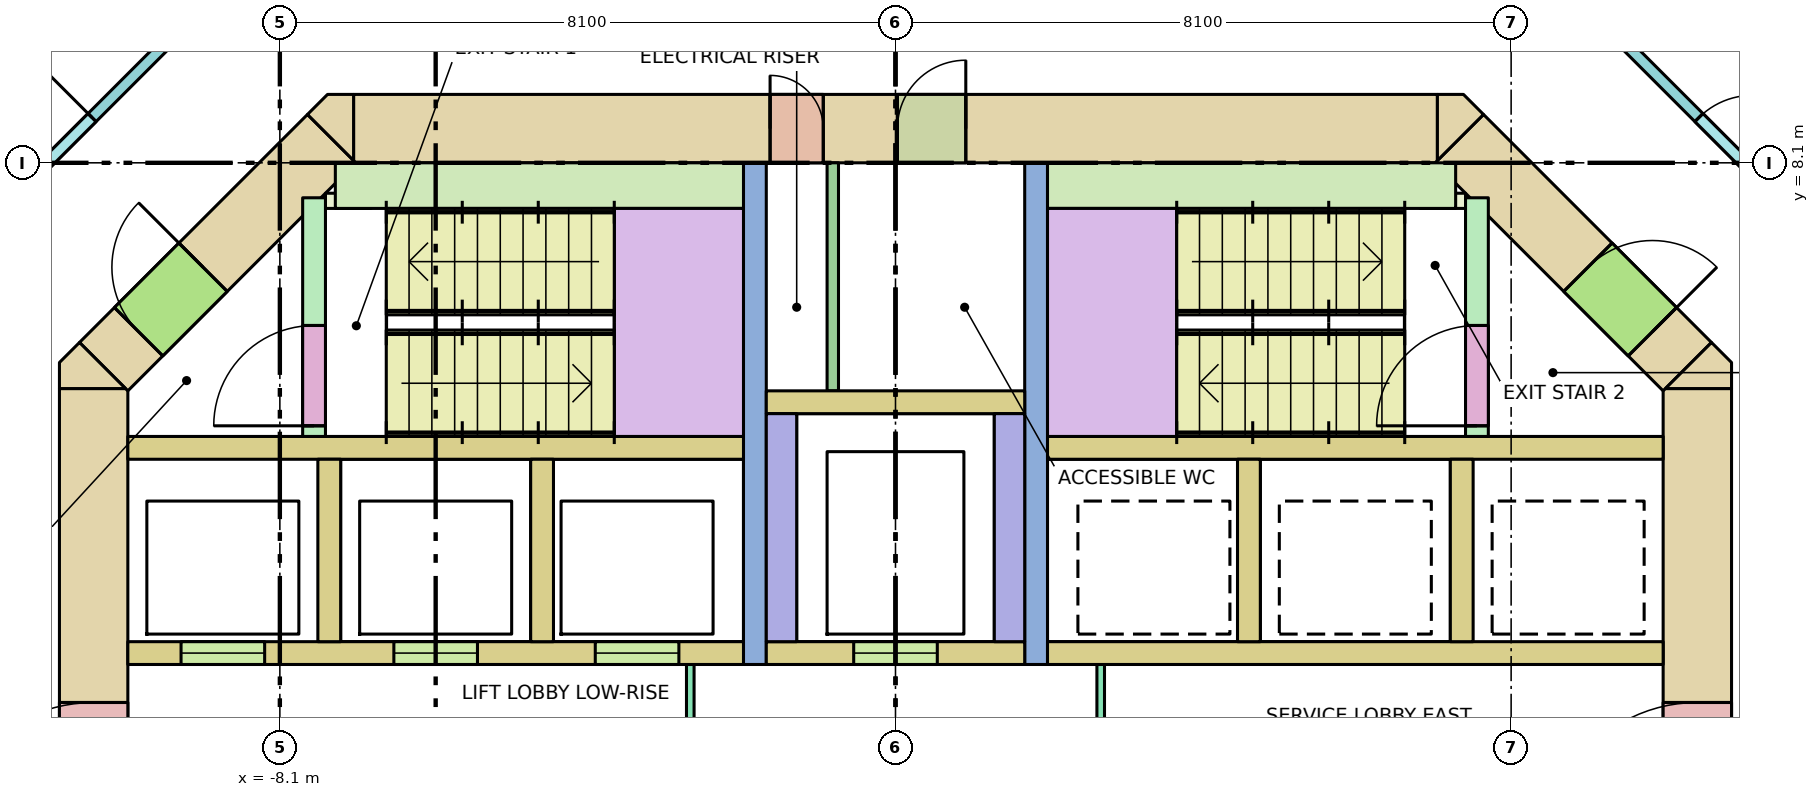
"""IFC4 building model, lengths in metres.
Left out: names, types, materials, properties, quantities, classifications, styles, units other than length and angle.
Written with IfcOpenShell. Run it as: python <this file> out.ifc"""

import sys

from ifc_helpers import new_model, si_unit, direction, frame, frame_2d, origin, place, context, subcontext, project, spatial, polyline, rectangle, outline, extrude, element, fill, save


model = new_model("IFC4")
c1 = context("Model", 3, precision=1e-05, world=origin(), true_north=direction((0.0, 1.0)))
c2 = subcontext(c1, "Body", "Model", "MODEL_VIEW")
j1 = project(units=[si_unit("LENGTHUNIT", "METRE"), si_unit("PLANEANGLEUNIT", "RADIAN")], contexts=[c1])
p1 = place(None, origin())
s1 = spatial("IfcSite", under=j1, at=p1, CompositionType="ELEMENT")
p2 = place(p1, origin())
s2 = spatial("IfcBuilding", under=s1, at=p2, CompositionType="ELEMENT")
p3 = place(p2, frame((0.0, 0.0, 116.2)))
s3 = spatial("IfcBuildingStorey", under=s2, at=p3, CompositionType="ELEMENT", Elevation=116.2)
p4 = place(p3, frame((-7.13, 8.55, -0.28), z_axis=(0.0, 0.0, 1.0), x_axis=(1.0, 0.0, 0.0)))
e1 = element("IfcWall", 1, at=p4, inside=s3, PredefinedType="SHEAR", context=c2, shape_type="SweptSolid", body=[
    extrude(rectangle(XDim=14.26, YDim=0.9, at=frame_2d((7.13, 0.0))), origin(), (0.0, 0.0, 1.0), 3.8),
])
p5 = place(p4, frame((5.48, 0.0, 0.28)))
e2 = element("IfcOpeningElement", 2, at=p5, cuts=e1, PredefinedType="OPENING", context=c2, shape_type="SweptSolid", body=[
    extrude(rectangle(XDim=0.7, YDim=2.1, at=frame_2d((0.35, 1.05))), frame((0.0, 0.46, 0.0), z_axis=(0.0, -1.0, 0.0), x_axis=(1.0, 0.0, 0.0)), (0.0, 0.0, 1.0), 0.92),
])
p6 = place(p4, frame((7.155, 0.0, 0.28)))
e3 = element("IfcOpeningElement", 3, at=p6, cuts=e1, PredefinedType="OPENING", context=c2, shape_type="SweptSolid", body=[
    extrude(rectangle(XDim=0.9, YDim=2.1, at=frame_2d((0.45, 1.05))), frame((0.0, 0.46, 0.0), z_axis=(0.0, -1.0, 0.0), x_axis=(1.0, 0.0, 0.0)), (0.0, 0.0, 1.0), 0.92),
])
p7 = place(p3, frame((-10.55, -5.13, -0.28), z_axis=(0.0, 0.0, 1.0), x_axis=(0.0, 1.0, 0.0)))
e4 = element("IfcWall", 4, at=p7, inside=s3, PredefinedType="SHEAR", context=c2, shape_type="SweptSolid", body=[
    extrude(rectangle(XDim=10.26, YDim=0.9, at=frame_2d((5.13, 0.0))), origin(), (0.0, 0.0, 1.0), 3.8),
])
p8 = place(p7, frame((4.13, 0.0, 0.28)))
e5 = element("IfcOpeningElement", 5, at=p8, cuts=e4, PredefinedType="OPENING", context=c2, shape_type="SweptSolid", body=[
    extrude(rectangle(XDim=2.0, YDim=2.1, at=frame_2d((1.0, 1.05))), frame((0.0, 0.46, 0.0), z_axis=(0.0, -1.0, 0.0), x_axis=(1.0, 0.0, 0.0)), (0.0, 0.0, 1.0), 0.92),
])
p9 = place(p3, frame((10.55, -5.13, -0.28), z_axis=(0.0, 0.0, 1.0), x_axis=(0.0, 1.0, 0.0)))
e6 = element("IfcWall", 6, at=p9, inside=s3, PredefinedType="SHEAR", context=c2, shape_type="SweptSolid", body=[
    extrude(rectangle(XDim=10.26, YDim=0.9, at=frame_2d((5.13, 0.0))), origin(), (0.0, 0.0, 1.0), 3.8),
])
p10 = place(p9, frame((4.13, 0.0, 0.28)))
e7 = element("IfcOpeningElement", 7, at=p10, cuts=e6, PredefinedType="OPENING", context=c2, shape_type="SweptSolid", body=[
    extrude(rectangle(XDim=2.0, YDim=2.1, at=frame_2d((1.0, 1.05))), frame((0.0, 0.46, 0.0), z_axis=(0.0, -1.0, 0.0), x_axis=(1.0, 0.0, 0.0)), (0.0, 0.0, 1.0), 0.92),
])
p11 = place(p3, frame((-10.418, 5.418, -0.28), z_axis=(0.0, 0.0, 1.0), x_axis=(0.707106781187, 0.707106781187, 0.0)))
e8 = element("IfcWall", 8, at=p11, inside=s3, PredefinedType="SHEAR", context=c2, shape_type="SweptSolid", body=[
    extrude(rectangle(XDim=4.243, YDim=0.9, at=frame_2d((2.121, 0.0))), origin(), (0.0, 0.0, 1.0), 3.8),
])
p12 = place(p11, frame((0.65, 0.0, 0.28)))
e9 = element("IfcOpeningElement", 9, at=p12, cuts=e8, PredefinedType="OPENING", context=c2, shape_type="SweptSolid", body=[
    extrude(rectangle(XDim=1.2, YDim=2.1, at=frame_2d((0.6, 1.05))), frame((0.0, 0.46, 0.0), z_axis=(0.0, -1.0, 0.0), x_axis=(1.0, 0.0, 0.0)), (0.0, 0.0, 1.0), 0.92),
])
p13 = place(p3, frame((7.418, 8.418, -0.28), z_axis=(0.0, 0.0, 1.0), x_axis=(0.707106781187, -0.707106781187, 0.0)))
e10 = element("IfcWall", 10, at=p13, inside=s3, PredefinedType="SHEAR", context=c2, shape_type="SweptSolid", body=[
    extrude(rectangle(XDim=4.243, YDim=0.9, at=frame_2d((2.121, 0.0))), origin(), (0.0, 0.0, 1.0), 3.8),
])
p14 = place(p13, frame((2.393, 0.0, 0.28)))
e11 = element("IfcOpeningElement", 11, at=p14, cuts=e10, PredefinedType="OPENING", context=c2, shape_type="SweptSolid", body=[
    extrude(rectangle(XDim=1.2, YDim=2.1, at=frame_2d((0.6, 1.05))), frame((0.0, 0.46, 0.0), z_axis=(0.0, -1.0, 0.0), x_axis=(1.0, 0.0, 0.0)), (0.0, 0.0, 1.0), 0.92),
])
p15 = place(p3, frame((0.0, 0.0, -0.28)))
e12 = element("IfcWall", 12, at=p15, inside=s3, PredefinedType="SHEAR", context=c2, shape_type="SweptSolid", body=[
    extrude(outline(polyline([(-10.736, 5.736), (-10.13, 5.13), (-11.0, 5.13), (-11.0, 5.473), (-10.736, 5.736)])), origin(), (0.0, 0.0, 1.0), 3.8),
])
p16 = place(p3, frame((0.0, 0.0, -0.28)))
e13 = element("IfcWall", 13, at=p16, inside=s3, PredefinedType="SHEAR", context=c2, shape_type="SweptSolid", body=[
    extrude(outline(polyline([(11.0, 5.473), (11.0, 5.13), (10.13, 5.13), (10.736, 5.736), (11.0, 5.473)])), origin(), (0.0, 0.0, 1.0), 3.8),
])
p17 = place(p3, frame((0.0, 0.0, -0.28)))
e14 = element("IfcWall", 14, at=p17, inside=s3, PredefinedType="SHEAR", context=c2, shape_type="SweptSolid", body=[
    extrude(outline(polyline([(-7.473, 9.0), (-7.13, 9.0), (-7.13, 8.13), (-7.736, 8.736), (-7.473, 9.0)])), origin(), (0.0, 0.0, 1.0), 3.8),
])
p18 = place(p3, frame((0.0, 0.0, -0.28)))
e15 = element("IfcWall", 15, at=p18, inside=s3, PredefinedType="SHEAR", context=c2, shape_type="SweptSolid", body=[
    extrude(outline(polyline([(7.473, 9.0), (7.736, 8.736), (7.13, 8.13), (7.13, 9.0), (7.473, 9.0)])), origin(), (0.0, 0.0, 1.0), 3.8),
])
for number, where, z_axis, x_axis in (
    (16, (-10.1, 4.35, 0.0), (0.0, 0.0, 1.0), (1.0, 0.0, 0.0)),
    (17, (2.0, 4.35, 0.0), (0.0, 0.0, 1.0), (1.0, 0.0, 0.0)),
):
    element("IfcWall", number, at=place(p3, frame(where, z_axis=z_axis, x_axis=x_axis)), inside=s3, PredefinedType="SOLIDWALL", context=c2, shape_type="SweptSolid", body=[
        extrude(rectangle(XDim=8.1, YDim=0.3, at=frame_2d((4.05, 0.0))), origin(), (0.0, 0.0, 1.0), 3.52),
    ])
p19 = place(p3, frame((-10.1, 1.65, 0.0), z_axis=(0.0, 0.0, 1.0), x_axis=(1.0, 0.0, 0.0)))
e18 = element("IfcWall", 18, at=p19, inside=s3, PredefinedType="SOLIDWALL", context=c2, shape_type="SweptSolid", body=[
    extrude(rectangle(XDim=8.1, YDim=0.3, at=frame_2d((4.05, 0.0))), origin(), (0.0, 0.0, 1.0), 3.52),
])
p20 = place(p19, frame((0.7, 0.0, 0.0)))
e19 = element("IfcOpeningElement", 19, at=p20, cuts=e18, PredefinedType="OPENING", context=c2, shape_type="SweptSolid", body=[
    extrude(rectangle(XDim=1.1, YDim=2.1, at=frame_2d((0.55, 1.05))), frame((0.0, 0.16, 0.0), z_axis=(0.0, -1.0, 0.0), x_axis=(1.0, 0.0, 0.0)), (0.0, 0.0, 1.0), 0.32),
])
p21 = place(p19, frame((3.5, 0.0, 0.0)))
e20 = element("IfcOpeningElement", 20, at=p21, cuts=e18, PredefinedType="OPENING", context=c2, shape_type="SweptSolid", body=[
    extrude(rectangle(XDim=1.1, YDim=2.1, at=frame_2d((0.55, 1.05))), frame((0.0, 0.16, 0.0), z_axis=(0.0, -1.0, 0.0), x_axis=(1.0, 0.0, 0.0)), (0.0, 0.0, 1.0), 0.32),
])
p22 = place(p19, frame((6.15, 0.0, 0.0)))
e21 = element("IfcOpeningElement", 21, at=p22, cuts=e18, PredefinedType="OPENING", context=c2, shape_type="SweptSolid", body=[
    extrude(rectangle(XDim=1.1, YDim=2.1, at=frame_2d((0.55, 1.05))), frame((0.0, 0.16, 0.0), z_axis=(0.0, -1.0, 0.0), x_axis=(1.0, 0.0, 0.0)), (0.0, 0.0, 1.0), 0.32),
])
p23 = place(p3, frame((2.0, 1.65, 0.0), z_axis=(0.0, 0.0, 1.0), x_axis=(1.0, 0.0, 0.0)))
e22 = element("IfcWall", 22, at=p23, inside=s3, PredefinedType="SOLIDWALL", context=c2, shape_type="SweptSolid", body=[
    extrude(rectangle(XDim=8.1, YDim=0.3, at=frame_2d((4.05, 0.0))), origin(), (0.0, 0.0, 1.0), 3.52),
])
for number, where, z_axis, x_axis in (
    (23, (-7.45, 1.8, 0.0), (0.0, 0.0, 1.0), (0.0, 1.0, 0.0)),
    (24, (-4.65, 1.8, 0.0), (0.0, 0.0, 1.0), (0.0, 1.0, 0.0)),
    (25, (4.65, 1.8, 0.0), (0.0, 0.0, 1.0), (0.0, 1.0, 0.0)),
    (26, (7.45, 1.8, 0.0), (0.0, 0.0, 1.0), (0.0, 1.0, 0.0)),
):
    element("IfcWall", number, at=place(p3, frame(where, z_axis=z_axis, x_axis=x_axis)), inside=s3, PredefinedType="SOLIDWALL", context=c2, shape_type="SweptSolid", body=[
        extrude(rectangle(XDim=2.4, YDim=0.3, at=frame_2d((1.2, 0.0))), origin(), (0.0, 0.0, 1.0), 3.52),
    ])
for number, where, z_axis, x_axis in (
    (27, (-1.85, 1.5, 0.0), (0.0, 0.0, 1.0), (0.0, 1.0, 0.0)),
    (28, (1.85, 1.5, 0.0), (0.0, 0.0, 1.0), (0.0, 1.0, 0.0)),
):
    element("IfcWall", number, at=place(p3, frame(where, z_axis=z_axis, x_axis=x_axis)), inside=s3, PredefinedType="SHEAR", context=c2, shape_type="SweptSolid", body=[
        extrude(rectangle(XDim=6.6, YDim=0.3, at=frame_2d((3.3, 0.0))), origin(), (0.0, 0.0, 1.0), 3.52),
    ])
p24 = place(p3, frame((-1.7, 1.65, 0.0), z_axis=(0.0, 0.0, 1.0), x_axis=(1.0, 0.0, 0.0)))
e29 = element("IfcWall", 29, at=p24, inside=s3, PredefinedType="SOLIDWALL", context=c2, shape_type="SweptSolid", body=[
    extrude(rectangle(XDim=3.4, YDim=0.3, at=frame_2d((1.7, 0.0))), origin(), (0.0, 0.0, 1.0), 3.52),
])
p25 = place(p24, frame((1.15, 0.0, 0.0)))
e30 = element("IfcOpeningElement", 30, at=p25, cuts=e29, PredefinedType="OPENING", context=c2, shape_type="SweptSolid", body=[
    extrude(rectangle(XDim=1.1, YDim=2.1, at=frame_2d((0.55, 1.05))), frame((0.0, 0.16, 0.0), z_axis=(0.0, -1.0, 0.0), x_axis=(1.0, 0.0, 0.0)), (0.0, 0.0, 1.0), 0.32),
])
for number, where, z_axis, x_axis in (
    (31, (-1.5, 1.8, 0.0), (0.0, 0.0, 1.0), (0.0, 1.0, 0.0)),
    (32, (1.5, 1.8, 0.0), (0.0, 0.0, 1.0), (0.0, 1.0, 0.0)),
):
    element("IfcWall", number, at=place(p3, frame(where, z_axis=z_axis, x_axis=x_axis)), inside=s3, PredefinedType="SOLIDWALL", context=c2, shape_type="SweptSolid", body=[
        extrude(rectangle(XDim=3.0, YDim=0.4, at=frame_2d((1.5, 0.0))), origin(), (0.0, 0.0, 1.0), 3.52),
    ])
p26 = place(p3, frame((-1.7, 4.95, 0.0), z_axis=(0.0, 0.0, 1.0), x_axis=(1.0, 0.0, 0.0)))
e33 = element("IfcWall", 33, at=p26, inside=s3, PredefinedType="SOLIDWALL", context=c2, shape_type="SweptSolid", body=[
    extrude(rectangle(XDim=3.4, YDim=0.3, at=frame_2d((1.7, 0.0))), origin(), (0.0, 0.0, 1.0), 3.52),
])
p27 = place(p3, frame((-7.65, 4.5, 0.0), z_axis=(0.0, 0.0, 1.0), x_axis=(0.0, 1.0, 0.0)))
e34 = element("IfcWall", 34, at=p27, inside=s3, PredefinedType="SHEAR", context=c2, shape_type="SweptSolid", body=[
    extrude(rectangle(XDim=3.14, YDim=0.3, at=frame_2d((1.57, 0.0))), origin(), (0.0, 0.0, 1.0), 3.52),
])
p28 = place(p27, frame((0.14, 0.0, 0.0)))
e35 = element("IfcOpeningElement", 35, at=p28, cuts=e34, PredefinedType="OPENING", context=c2, shape_type="SweptSolid", body=[
    extrude(rectangle(XDim=1.32, YDim=2.1, at=frame_2d((0.66, 1.05))), frame((0.0, 0.16, 0.0), z_axis=(0.0, -1.0, 0.0), x_axis=(1.0, 0.0, 0.0)), (0.0, 0.0, 1.0), 0.32),
])
p29 = place(p3, frame((-7.37, 7.8, 0.0), z_axis=(0.0, 0.0, 1.0), x_axis=(1.0, 0.0, 0.0)))
e36 = element("IfcWall", 36, at=p29, inside=s3, PredefinedType="SHEAR", context=c2, shape_type="SweptSolid", body=[
    extrude(rectangle(XDim=5.37, YDim=0.6, at=frame_2d((2.685, 0.0))), origin(), (0.0, 0.0, 1.0), 3.52),
])
p30 = place(p3, frame((7.65, 4.5, 0.0), z_axis=(0.0, 0.0, 1.0), x_axis=(0.0, 1.0, 0.0)))
e37 = element("IfcWall", 37, at=p30, inside=s3, PredefinedType="SHEAR", context=c2, shape_type="SweptSolid", body=[
    extrude(rectangle(XDim=3.14, YDim=0.3, at=frame_2d((1.57, 0.0))), origin(), (0.0, 0.0, 1.0), 3.52),
])
p31 = place(p30, frame((0.14, 0.0, 0.0)))
e38 = element("IfcOpeningElement", 38, at=p31, cuts=e37, PredefinedType="OPENING", context=c2, shape_type="SweptSolid", body=[
    extrude(rectangle(XDim=1.32, YDim=2.1, at=frame_2d((0.66, 1.05))), frame((0.0, 0.16, 0.0), z_axis=(0.0, -1.0, 0.0), x_axis=(1.0, 0.0, 0.0)), (0.0, 0.0, 1.0), 0.32),
])
p32 = place(p3, frame((2.0, 7.8, 0.0), z_axis=(0.0, 0.0, 1.0), x_axis=(1.0, 0.0, 0.0)))
e39 = element("IfcWall", 39, at=p32, inside=s3, PredefinedType="SHEAR", context=c2, shape_type="SweptSolid", body=[
    extrude(rectangle(XDim=5.37, YDim=0.6, at=frame_2d((2.685, 0.0))), origin(), (0.0, 0.0, 1.0), 3.52),
])
for number, where, z_axis, x_axis in (
    (40, (-7.5, 7.6, 0.0), (0.0, 0.0, 1.0), (1.0, 0.0, 0.0)),
    (41, (6.9, 7.6, 0.0), (0.0, 0.0, 1.0), (1.0, 0.0, 0.0)),
):
    element("IfcWall", number, at=place(p3, frame(where, z_axis=z_axis, x_axis=x_axis)), inside=s3, PredefinedType="SHEAR", context=c2, shape_type="SweptSolid", body=[
        extrude(rectangle(XDim=0.6, YDim=0.2, at=frame_2d((0.3, 0.0))), origin(), (0.0, 0.0, 1.0), 3.52),
    ])
p33 = place(p3, frame((-2.7, -1.5, 0.0), z_axis=(0.0, 0.0, 1.0), x_axis=(0.0, 1.0, 0.0)))
e42 = element("IfcWall", 42, at=p33, inside=s3, PredefinedType="PARTITIONING", context=c2, shape_type="SweptSolid", body=[
    extrude(rectangle(XDim=3.0, YDim=0.1, at=frame_2d((1.5, 0.0))), origin(), (0.0, 0.0, 1.0), 3.52),
])
p34 = place(p33, frame((0.9, 0.0, 0.0)))
e43 = element("IfcOpeningElement", 43, at=p34, cuts=e42, PredefinedType="OPENING", context=c2, shape_type="SweptSolid", body=[
    extrude(rectangle(XDim=1.2, YDim=2.1, at=frame_2d((0.6, 1.05))), frame((0.0, 0.06, 0.0), z_axis=(0.0, -1.0, 0.0), x_axis=(1.0, 0.0, 0.0)), (0.0, 0.0, 1.0), 0.12),
])
p35 = place(p3, frame((2.7, -1.5, 0.0), z_axis=(0.0, 0.0, 1.0), x_axis=(0.0, 1.0, 0.0)))
e44 = element("IfcWall", 44, at=p35, inside=s3, PredefinedType="PARTITIONING", context=c2, shape_type="SweptSolid", body=[
    extrude(rectangle(XDim=3.0, YDim=0.1, at=frame_2d((1.5, 0.0))), origin(), (0.0, 0.0, 1.0), 3.52),
])
p36 = place(p35, frame((0.9, 0.0, 0.0)))
e45 = element("IfcOpeningElement", 45, at=p36, cuts=e44, PredefinedType="OPENING", context=c2, shape_type="SweptSolid", body=[
    extrude(rectangle(XDim=1.2, YDim=2.1, at=frame_2d((0.6, 1.05))), frame((0.0, 0.06, 0.0), z_axis=(0.0, -1.0, 0.0), x_axis=(1.0, 0.0, 0.0)), (0.0, 0.0, 1.0), 0.12),
])
p37 = place(p3, frame((-0.825, 5.1, 0.0), z_axis=(0.0, 0.0, 1.0), x_axis=(0.0, 1.0, 0.0)))
e46 = element("IfcWall", 46, at=p37, inside=s3, PredefinedType="PARTITIONING", context=c2, shape_type="SweptSolid", body=[
    extrude(rectangle(XDim=3.0, YDim=0.15, at=frame_2d((1.5, 0.0))), origin(), (0.0, 0.0, 1.0), 3.52),
])
p38 = place(p3, frame((-12.975, 6.291, 0.0), z_axis=(0.0, 0.0, 1.0), x_axis=(0.707125355289, 0.707088206597, 0.0)))
e47 = element("IfcWall", 47, at=p38, inside=s3, PredefinedType="PARTITIONING", context=c2, shape_type="SweptSolid", body=[
    extrude(rectangle(XDim=6.572, YDim=0.15, at=frame_2d((3.286, 0.0))), origin(), (0.0, 0.0, 1.0), 2.67),
])
p39 = place(p38, frame((2.4, 0.0, 0.0)))
e48 = element("IfcOpeningElement", 48, at=p39, cuts=e47, PredefinedType="OPENING", context=c2, shape_type="SweptSolid", body=[
    extrude(rectangle(XDim=1.0, YDim=2.1, at=frame_2d((0.5, 1.05))), frame((0.0, 0.085, 0.0), z_axis=(0.0, -1.0, 0.0), x_axis=(1.0, 0.0, 0.0)), (0.0, 0.0, 1.0), 0.17),
])
p40 = place(p3, frame((8.291, 10.975, 0.0), z_axis=(0.0, 0.0, 1.0), x_axis=(0.707088206597, -0.707125355289, 0.0)))
e49 = element("IfcWall", 49, at=p40, inside=s3, PredefinedType="PARTITIONING", context=c2, shape_type="SweptSolid", body=[
    extrude(rectangle(XDim=6.572, YDim=0.15, at=frame_2d((3.286, 0.0))), origin(), (0.0, 0.0, 1.0), 2.67),
])
p41 = place(p40, frame((3.224, 0.0, 0.0)))
e50 = element("IfcOpeningElement", 50, at=p41, cuts=e49, PredefinedType="OPENING", context=c2, shape_type="SweptSolid", body=[
    extrude(rectangle(XDim=1.0, YDim=2.1, at=frame_2d((0.5, 1.05))), frame((0.0, 0.085, 0.0), z_axis=(0.0, -1.0, 0.0), x_axis=(1.0, 0.0, 0.0)), (0.0, 0.0, 1.0), 0.17),
])
p42 = place(p20, origin())
e51 = element("IfcDoor", 51, at=p42, inside=s3, OperationType="DOUBLE_DOOR_SLIDING", PredefinedType="DOOR", context=c2, shape_type="SweptSolid", body=[
    extrude(rectangle(XDim=1.1, YDim=2.1, at=frame_2d((0.55, 1.05))), frame((0.0, 0.025, 0.0), z_axis=(0.0, -1.0, 0.0), x_axis=(1.0, 0.0, 0.0)), (0.0, 0.0, 1.0), 0.05),
])
fill(e19, e51)
p43 = place(p21, origin())
e52 = element("IfcDoor", 52, at=p43, inside=s3, OperationType="DOUBLE_DOOR_SLIDING", PredefinedType="DOOR", context=c2, shape_type="SweptSolid", body=[
    extrude(rectangle(XDim=1.1, YDim=2.1, at=frame_2d((0.55, 1.05))), frame((0.0, 0.025, 0.0), z_axis=(0.0, -1.0, 0.0), x_axis=(1.0, 0.0, 0.0)), (0.0, 0.0, 1.0), 0.05),
])
fill(e20, e52)
p44 = place(p22, origin())
e53 = element("IfcDoor", 53, at=p44, inside=s3, OperationType="DOUBLE_DOOR_SLIDING", PredefinedType="DOOR", context=c2, shape_type="SweptSolid", body=[
    extrude(rectangle(XDim=1.1, YDim=2.1, at=frame_2d((0.55, 1.05))), frame((0.0, 0.025, 0.0), z_axis=(0.0, -1.0, 0.0), x_axis=(1.0, 0.0, 0.0)), (0.0, 0.0, 1.0), 0.05),
])
fill(e21, e53)
p45 = place(p25, origin())
e54 = element("IfcDoor", 54, at=p45, inside=s3, OperationType="DOUBLE_DOOR_SLIDING", PredefinedType="DOOR", context=c2, shape_type="SweptSolid", body=[
    extrude(rectangle(XDim=1.1, YDim=2.1, at=frame_2d((0.55, 1.05))), frame((0.0, 0.025, 0.0), z_axis=(0.0, -1.0, 0.0), x_axis=(1.0, 0.0, 0.0)), (0.0, 0.0, 1.0), 0.05),
])
fill(e30, e54)
p46 = place(p28, origin())
e55 = element("IfcDoor", 55, at=p46, inside=s3, OperationType="DOUBLE_DOOR_SINGLE_SWING", PredefinedType="DOOR", context=c2, shape_type="SweptSolid", body=[
    extrude(rectangle(XDim=1.32, YDim=2.1, at=frame_2d((0.66, 1.05))), frame((0.0, 0.025, 0.0), z_axis=(0.0, -1.0, 0.0), x_axis=(1.0, 0.0, 0.0)), (0.0, 0.0, 1.0), 0.05),
])
fill(e35, e55)
p47 = place(p12, origin())
e56 = element("IfcDoor", 56, at=p47, inside=s3, OperationType="SINGLE_SWING_RIGHT", PredefinedType="DOOR", context=c2, shape_type="SweptSolid", body=[
    extrude(rectangle(XDim=1.2, YDim=2.1, at=frame_2d((0.6, 1.05))), frame((0.0, 0.025, 0.0), z_axis=(0.0, -1.0, 0.0), x_axis=(1.0, 0.0, 0.0)), (0.0, 0.0, 1.0), 0.05),
])
fill(e9, e56)
p48 = place(p31, origin())
e57 = element("IfcDoor", 57, at=p48, inside=s3, OperationType="DOUBLE_DOOR_SINGLE_SWING", PredefinedType="DOOR", context=c2, shape_type="SweptSolid", body=[
    extrude(rectangle(XDim=1.32, YDim=2.1, at=frame_2d((0.66, 1.05))), frame((0.0, 0.025, 0.0), z_axis=(0.0, -1.0, 0.0), x_axis=(1.0, 0.0, 0.0)), (0.0, 0.0, 1.0), 0.05),
])
fill(e38, e57)
p49 = place(p14, origin())
e58 = element("IfcDoor", 58, at=p49, inside=s3, OperationType="SINGLE_SWING_RIGHT", PredefinedType="DOOR", context=c2, shape_type="SweptSolid", body=[
    extrude(rectangle(XDim=1.2, YDim=2.1, at=frame_2d((0.6, 1.05))), frame((0.0, 0.025, 0.0), z_axis=(0.0, -1.0, 0.0), x_axis=(1.0, 0.0, 0.0)), (0.0, 0.0, 1.0), 0.05),
])
fill(e11, e58)
p50 = place(p8, origin())
e59 = element("IfcDoor", 59, at=p50, inside=s3, OperationType="DOUBLE_DOOR_SINGLE_SWING", PredefinedType="DOOR", context=c2, shape_type="SweptSolid", body=[
    extrude(rectangle(XDim=2.0, YDim=2.1, at=frame_2d((1.0, 1.05))), frame((0.0, 0.025, 0.0), z_axis=(0.0, -1.0, 0.0), x_axis=(1.0, 0.0, 0.0)), (0.0, 0.0, 1.0), 0.05),
])
fill(e5, e59)
p51 = place(p10, origin())
e60 = element("IfcDoor", 60, at=p51, inside=s3, OperationType="DOUBLE_DOOR_SINGLE_SWING", PredefinedType="DOOR", context=c2, shape_type="SweptSolid", body=[
    extrude(rectangle(XDim=2.0, YDim=2.1, at=frame_2d((1.0, 1.05))), frame((0.0, 0.025, 0.0), z_axis=(0.0, -1.0, 0.0), x_axis=(1.0, 0.0, 0.0)), (0.0, 0.0, 1.0), 0.05),
])
fill(e7, e60)
p52 = place(p5, origin())
e61 = element("IfcDoor", 61, at=p52, inside=s3, OperationType="SINGLE_SWING_LEFT", PredefinedType="DOOR", context=c2, shape_type="SweptSolid", body=[
    extrude(rectangle(XDim=0.7, YDim=2.1, at=frame_2d((0.35, 1.05))), frame((0.0, 0.025, 0.0), z_axis=(0.0, -1.0, 0.0), x_axis=(1.0, 0.0, 0.0)), (0.0, 0.0, 1.0), 0.05),
])
fill(e2, e61)
p53 = place(p6, origin())
e62 = element("IfcDoor", 62, at=p53, inside=s3, OperationType="SINGLE_SWING_RIGHT", PredefinedType="DOOR", context=c2, shape_type="SweptSolid", body=[
    extrude(rectangle(XDim=0.9, YDim=2.1, at=frame_2d((0.45, 1.05))), frame((0.0, 0.025, 0.0), z_axis=(0.0, -1.0, 0.0), x_axis=(1.0, 0.0, 0.0)), (0.0, 0.0, 1.0), 0.05),
])
fill(e3, e62)
p54 = place(p39, origin())
e63 = element("IfcDoor", 63, at=p54, inside=s3, OperationType="SINGLE_SWING_RIGHT", PredefinedType="DOOR", context=c2, shape_type="SweptSolid", body=[
    extrude(rectangle(XDim=1.0, YDim=2.1, at=frame_2d((0.5, 1.05))), frame((0.0, 0.025, 0.0), z_axis=(0.0, -1.0, 0.0), x_axis=(1.0, 0.0, 0.0)), (0.0, 0.0, 1.0), 0.05),
])
fill(e48, e63)
p55 = place(p41, origin())
e64 = element("IfcDoor", 64, at=p55, inside=s3, OperationType="SINGLE_SWING_RIGHT", PredefinedType="DOOR", context=c2, shape_type="SweptSolid", body=[
    extrude(rectangle(XDim=1.0, YDim=2.1, at=frame_2d((0.5, 1.05))), frame((0.0, 0.025, 0.0), z_axis=(0.0, -1.0, 0.0), x_axis=(1.0, 0.0, 0.0)), (0.0, 0.0, 1.0), 0.05),
])
fill(e50, e64)
save(model, sys.argv[1])
